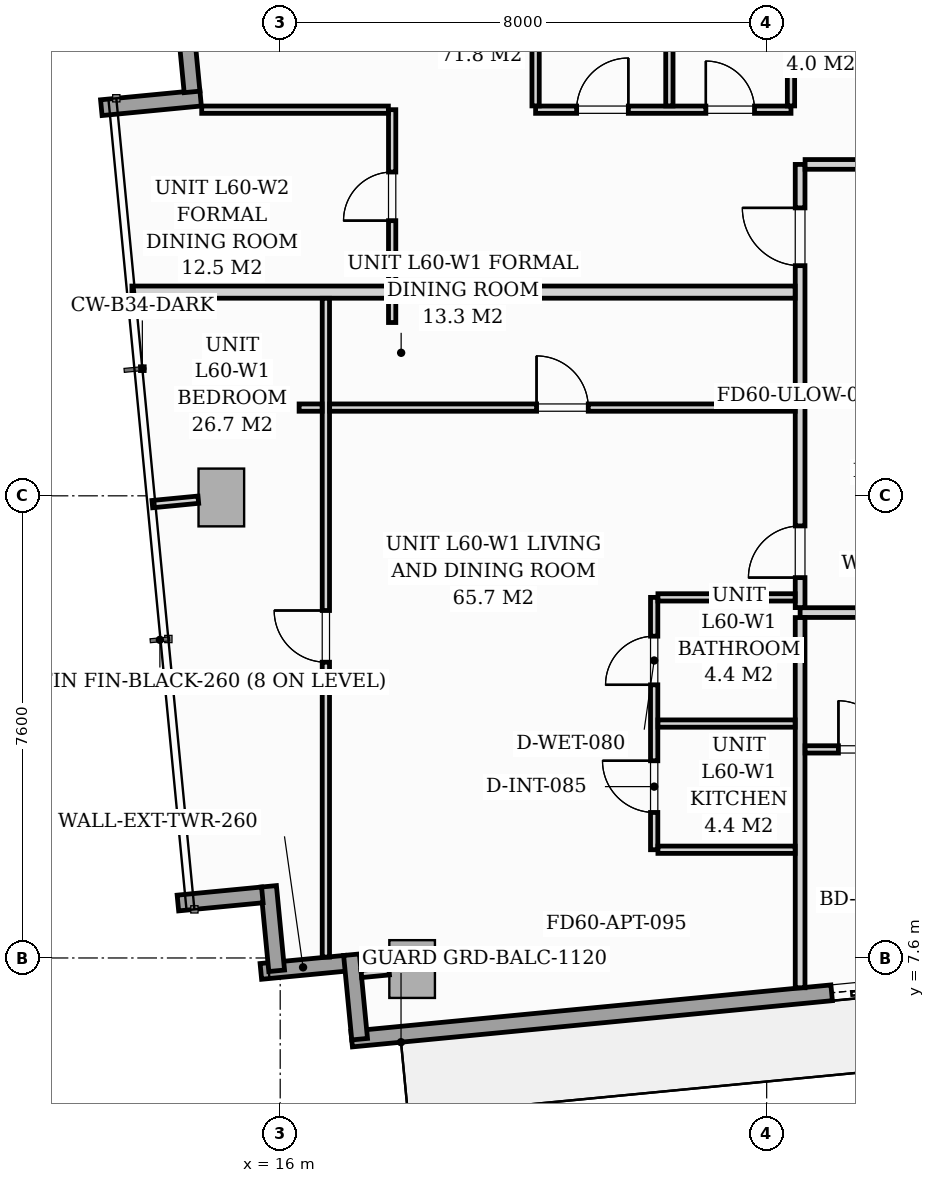
"""IFC4 building model, lengths in metres.
Left out: names, types, materials, properties, quantities, classifications, styles, units other than length and angle.
Written with IfcOpenShell. Run it as: python <this file> out.ifc"""

import sys

from ifc_helpers import new_model, si_unit, direction, frame, frame_2d, origin, origin_2d, place, context, subcontext, project, spatial, rectangle, extrude, source, transform, mapped, element, fill, save


model = new_model("IFC4")
c1 = context("Model", 3, precision=1e-05, world=origin(), true_north=direction((0.0, 1.0)))
c2 = subcontext(c1, "Body", "Model", "MODEL_VIEW")
j1 = project(units=[si_unit("LENGTHUNIT", "METRE"), si_unit("PLANEANGLEUNIT", "RADIAN")], contexts=[c1])
p1 = place(None, origin())
s1 = spatial("IfcSite", under=j1, at=p1, CompositionType="ELEMENT")
p2 = place(p1, origin())
s2 = spatial("IfcBuilding", under=s1, at=p2, CompositionType="ELEMENT")
p3 = place(p2, frame((0.0, 0.0, 208.2)))
s3 = spatial("IfcBuildingStorey", under=s2, at=p3, CompositionType="ELEMENT", Elevation=208.2)
m1 = source(origin(), c2, "Body", "SweptSolid", [
    extrude(rectangle(XDim=0.75, YDim=0.95, at=origin_2d()), origin(), (0.0, 0.0, 1.0), 3.194),
])
for number, where, z_axis, x_axis in (
    (1, (18.169, 7.418, 0.002), (0.0, 0.0, 1.0), (0.995, 0.096, 0.0)),
    (2, (15.032, 15.173, 0.002), (0.0, 0.0, 1.0), (0.995, 0.096, 0.0)),
):
    element("IfcColumn", number, at=place(p3, frame(where, z_axis=z_axis, x_axis=x_axis)), inside=s3, PredefinedType="COLUMN", context=c2, shape_type="MappedRepresentation", body=[
        mapped(m1, transform((0.0, 0.0, 0.0), scale=1.0)),
    ])
p4 = place(p3, frame((17.07, 7.513, 0.0), z_axis=(0.0, 0.0, 1.0), x_axis=(-0.995391056452, -0.09589913835, 0.0)))
e3 = element("IfcWall", 3, at=p4, inside=s3, PredefinedType="STANDARD", context=c2, shape_type="SweptSolid", body=[
    extrude(rectangle(XDim=1.395, YDim=0.26, at=frame_2d((0.698, 0.0))), origin(), (0.0, 0.0, 1.0), 2.9),
])
p5 = place(p3, frame((15.942, 7.389, 0.0), z_axis=(0.0, 0.0, 1.0), x_axis=(-0.095742423056, 0.99540614245, 0.0)))
e4 = element("IfcWall", 4, at=p5, inside=s3, PredefinedType="STANDARD", context=c2, shape_type="SweptSolid", body=[
    extrude(rectangle(XDim=1.395, YDim=0.26, at=frame_2d((0.697, 0.0))), origin(), (0.0, 0.0, 1.0), 2.9),
])
p6 = place(p3, frame((15.706, 8.637, 0.0), z_axis=(0.0, 0.0, 1.0), x_axis=(-0.995391056452, -0.09589913835, 0.0)))
e5 = element("IfcWall", 5, at=p6, inside=s3, PredefinedType="STANDARD", context=c2, shape_type="SweptSolid", body=[
    extrude(rectangle(XDim=1.395, YDim=0.26, at=frame_2d((0.698, 0.0))), origin(), (0.0, 0.0, 1.0), 2.9),
])
p7 = place(p3, frame((13.058, 21.583, 0.0), z_axis=(0.0, 0.0, 1.0), x_axis=(0.995394563142, 0.095862733462, 0.0)))
e6 = element("IfcWall", 6, at=p7, inside=s3, PredefinedType="STANDARD", context=c2, shape_type="SweptSolid", body=[
    extrude(rectangle(XDim=1.64, YDim=0.26, at=frame_2d((0.82, 0.0))), origin(), (0.0, 0.0, 1.0), 2.9),
])
p8 = place(p3, frame((14.55, 21.843, 0.0), z_axis=(0.0, 0.0, 1.0), x_axis=(-0.09576095695, 0.995404359607, 0.0)))
e7 = element("IfcWall", 7, at=p8, inside=s3, PredefinedType="STANDARD", context=c2, shape_type="SweptSolid", body=[
    extrude(rectangle(XDim=1.15, YDim=0.26, at=frame_2d((0.575, 0.0))), origin(), (0.0, 0.0, 1.0), 2.9),
])
p9 = place(p3, frame((33.201, 7.81, 0.0), z_axis=(0.0, 0.0, 1.0), x_axis=(-0.995397074604, -0.095836652014, 0.0)))
e8 = element("IfcWall", 8, at=p9, inside=s3, PredefinedType="STANDARD", context=c2, shape_type="SweptSolid", body=[
    extrude(rectangle(XDim=16.1, YDim=0.26, at=frame_2d((8.05, 0.0))), origin(), (0.0, 0.0, 1.0), 2.9),
])
p10 = place(p9, frame((6.37, 0.0, 0.0)))
e9 = element("IfcOpeningElement", 9, at=p10, cuts=e8, PredefinedType="OPENING", context=c2, shape_type="SweptSolid", body=[
    extrude(rectangle(XDim=1.8, YDim=2.06, at=frame_2d((0.9, 1.03))), frame((0.0, 0.14, 0.0), z_axis=(0.0, -1.0, 0.0), x_axis=(1.0, 0.0, 0.0)), (0.0, 0.0, 1.0), 0.28),
])
p11 = place(p9, frame((1.6, 0.0, 0.65)))
e10 = element("IfcOpeningElement", 10, at=p11, cuts=e8, PredefinedType="OPENING", context=c2, shape_type="SweptSolid", body=[
    extrude(rectangle(XDim=1.6, YDim=1.5, at=frame_2d((0.8, 0.75))), frame((0.0, 0.14, 0.0), z_axis=(0.0, -1.0, 0.0), x_axis=(1.0, 0.0, 0.0)), (0.0, 0.0, 1.0), 0.28),
])
p12 = place(p3, frame((17.306, 6.265, 0.0), z_axis=(0.0, 0.0, 1.0), x_axis=(-0.095915846097, 0.995389446633, 0.0)))
e11 = element("IfcWall", 11, at=p12, inside=s3, PredefinedType="STANDARD", context=c2, shape_type="SweptSolid", body=[
    extrude(rectangle(XDim=1.395, YDim=0.26, at=frame_2d((0.697, 0.0))), origin(), (0.0, 0.0, 1.0), 2.9),
])
p13 = place(p3, frame((24.55, 13.28, 0.0), z_axis=(0.0, 0.0, 1.0), x_axis=(1.0, 0.0, 0.0)))
e12 = element("IfcWall", 12, at=p13, inside=s3, PredefinedType="PARTITIONING", context=c2, shape_type="SweptSolid", body=[
    extrude(rectangle(XDim=22.9, YDim=0.16, at=frame_2d((11.45, 0.0))), origin(), (0.0, 0.0, 1.0), 2.9),
])
p14 = place(p13, frame((5.378, 0.0, 0.0)))
e13 = element("IfcOpeningElement", 13, at=p14, cuts=e12, PredefinedType="OPENING", context=c2, shape_type="SweptSolid", body=[
    extrude(rectangle(XDim=0.95, YDim=2.06, at=frame_2d((0.475, 1.03))), frame((0.0, 0.09, 0.0), z_axis=(0.0, -1.0, 0.0), x_axis=(1.0, 0.0, 0.0)), (0.0, 0.0, 1.0), 0.18),
])
p15 = place(p13, frame((13.025, 0.0, 0.0)))
e14 = element("IfcOpeningElement", 14, at=p15, cuts=e12, PredefinedType="OPENING", context=c2, shape_type="SweptSolid", body=[
    extrude(rectangle(XDim=0.95, YDim=2.06, at=frame_2d((0.475, 1.03))), frame((0.0, 0.09, 0.0), z_axis=(0.0, -1.0, 0.0), x_axis=(1.0, 0.0, 0.0)), (0.0, 0.0, 1.0), 0.18),
])
p16 = place(p13, frame((16.572, 0.0, 0.0)))
e15 = element("IfcOpeningElement", 15, at=p16, cuts=e12, PredefinedType="OPENING", context=c2, shape_type="SweptSolid", body=[
    extrude(rectangle(XDim=0.95, YDim=2.06, at=frame_2d((0.475, 1.03))), frame((0.0, 0.09, 0.0), z_axis=(0.0, -1.0, 0.0), x_axis=(1.0, 0.0, 0.0)), (0.0, 0.0, 1.0), 0.18),
])
p17 = place(p3, frame((24.55, 7.11, 0.0), z_axis=(0.0, 0.0, 1.0), x_axis=(0.0, 1.0, 0.0)))
e16 = element("IfcWall", 16, at=p17, inside=s3, PredefinedType="PARTITIONING", context=c2, shape_type="SweptSolid", body=[
    extrude(rectangle(XDim=6.088, YDim=0.16, at=frame_2d((3.044, 0.0))), origin(), (0.0, 0.0, 1.0), 2.9),
])
p18 = place(p3, frame((24.55, 13.362, 0.0), z_axis=(0.0, 0.0, 1.0), x_axis=(0.0, 1.0, 0.0)))
e17 = element("IfcWall", 17, at=p18, inside=s3, PredefinedType="PARTITIONING", context=c2, shape_type="SweptSolid", body=[
    extrude(rectangle(XDim=7.288, YDim=0.16, at=frame_2d((3.644, 0.0))), origin(), (0.0, 0.0, 1.0), 2.9),
])
p19 = place(p18, frame((0.493, 0.0, 0.0)))
e18 = element("IfcOpeningElement", 18, at=p19, cuts=e17, PredefinedType="OPENING", context=c2, shape_type="SweptSolid", body=[
    extrude(rectangle(XDim=0.85, YDim=2.0, at=frame_2d((0.425, 1.0))), frame((0.0, 0.09, 0.0), z_axis=(0.0, -1.0, 0.0), x_axis=(1.0, 0.0, 0.0)), (0.0, 0.0, 1.0), 0.18),
])
p20 = place(p18, frame((5.623, 0.0, 0.0)))
e19 = element("IfcOpeningElement", 19, at=p20, cuts=e17, PredefinedType="OPENING", context=c2, shape_type="SweptSolid", body=[
    extrude(rectangle(XDim=0.95, YDim=2.06, at=frame_2d((0.475, 1.03))), frame((0.0, 0.09, 0.0), z_axis=(0.0, -1.0, 0.0), x_axis=(1.0, 0.0, 0.0)), (0.0, 0.0, 1.0), 0.18),
])
p21 = place(p3, frame((24.632, 20.65, 0.0), z_axis=(0.0, 0.0, 1.0), x_axis=(1.0, 0.0, 0.0)))
e20 = element("IfcWall", 20, at=p21, inside=s3, PredefinedType="PARTITIONING", context=c2, shape_type="SweptSolid", body=[
    extrude(rectangle(XDim=1.566, YDim=0.16, at=frame_2d((0.783, 0.0))), origin(), (0.0, 0.0, 1.0), 2.9),
])
p22 = place(p3, frame((24.632, 11.03, 0.0), z_axis=(0.0, 0.0, 1.0), x_axis=(1.0, 0.0, 0.0)))
e21 = element("IfcWall", 21, at=p22, inside=s3, PredefinedType="PARTITIONING", context=c2, shape_type="SweptSolid", body=[
    extrude(rectangle(XDim=4.098, YDim=0.12, at=frame_2d((2.049, 0.0))), origin(), (0.0, 0.0, 1.0), 2.9),
])
p23 = place(p22, frame((0.548, 0.0, 0.0)))
e22 = element("IfcOpeningElement", 22, at=p23, cuts=e21, PredefinedType="OPENING", context=c2, shape_type="SweptSolid", body=[
    extrude(rectangle(XDim=0.8, YDim=2.02, at=frame_2d((0.4, 1.01))), frame((0.0, 0.07, 0.0), z_axis=(0.0, -1.0, 0.0), x_axis=(1.0, 0.0, 0.0)), (0.0, 0.0, 1.0), 0.14),
])
p24 = place(p22, frame((2.573, 0.0, 0.0)))
e23 = element("IfcOpeningElement", 23, at=p24, cuts=e21, PredefinedType="OPENING", context=c2, shape_type="SweptSolid", body=[
    extrude(rectangle(XDim=0.85, YDim=2.05, at=frame_2d((0.425, 1.025))), frame((0.0, 0.07, 0.0), z_axis=(0.0, -1.0, 0.0), x_axis=(1.0, 0.0, 0.0)), (0.0, 0.0, 1.0), 0.14),
])
p25 = place(p3, frame((13.561, 18.55, 0.0), z_axis=(0.0, 0.0, 1.0), x_axis=(1.0, 0.0, 0.0)))
e24 = element("IfcWall", 24, at=p25, inside=s3, PredefinedType="PARTITIONING", context=c2, shape_type="SweptSolid", body=[
    extrude(rectangle(XDim=10.907, YDim=0.2, at=frame_2d((5.453, 0.0))), origin(), (0.0, 0.0, 1.0), 2.9),
])
p26 = place(p3, frame((22.15, 9.38, 0.0), z_axis=(0.0, 0.0, 1.0), x_axis=(0.0, 1.0, 0.0)))
e25 = element("IfcWall", 25, at=p26, inside=s3, PredefinedType="PARTITIONING", context=c2, shape_type="SweptSolid", body=[
    extrude(rectangle(XDim=4.15, YDim=0.12, at=frame_2d((2.075, 0.0))), origin(), (0.0, 0.0, 1.0), 2.9),
])
p27 = place(p26, frame((0.613, 0.0, 0.0)))
e26 = element("IfcOpeningElement", 26, at=p27, cuts=e25, PredefinedType="OPENING", context=c2, shape_type="SweptSolid", body=[
    extrude(rectangle(XDim=0.85, YDim=2.05, at=frame_2d((0.425, 1.025))), frame((0.0, 0.07, 0.0), z_axis=(0.0, -1.0, 0.0), x_axis=(1.0, 0.0, 0.0)), (0.0, 0.0, 1.0), 0.14),
])
p28 = place(p26, frame((2.712, 0.0, 0.0)))
e27 = element("IfcOpeningElement", 27, at=p28, cuts=e25, PredefinedType="OPENING", context=c2, shape_type="SweptSolid", body=[
    extrude(rectangle(XDim=0.8, YDim=2.02, at=frame_2d((0.4, 1.01))), frame((0.0, 0.07, 0.0), z_axis=(0.0, -1.0, 0.0), x_axis=(1.0, 0.0, 0.0)), (0.0, 0.0, 1.0), 0.14),
])
for number, where, z_axis, x_axis in (
    (28, (22.212, 11.455, 0.0), (0.0, 0.0, 1.0), (1.0, 0.0, 0.0)),
    (29, (22.212, 9.38, 0.0), (0.0, 0.0, 1.0), (1.0, 0.0, 0.0)),
    (30, (22.212, 13.53, 0.0), (0.0, 0.0, 1.0), (1.0, 0.0, 0.0)),
):
    element("IfcWall", number, at=place(p3, frame(where, z_axis=z_axis, x_axis=x_axis)), inside=s3, PredefinedType="PARTITIONING", context=c2, shape_type="SweptSolid", body=[
        extrude(rectangle(XDim=2.256, YDim=0.12, at=frame_2d((1.128, 0.0))), origin(), (0.0, 0.0, 1.0), 2.9),
    ])
p29 = place(p3, frame((16.751, 7.615, 0.0), z_axis=(0.0, 0.0, 1.0), x_axis=(0.0, 1.0, 0.0)))
e31 = element("IfcWall", 31, at=p29, inside=s3, PredefinedType="PARTITIONING", context=c2, shape_type="SweptSolid", body=[
    extrude(rectangle(XDim=10.833, YDim=0.12, at=frame_2d((5.417, 0.0))), origin(), (0.0, 0.0, 1.0), 2.9),
])
p30 = place(p29, frame((4.849, 0.0, 0.0)))
e32 = element("IfcOpeningElement", 32, at=p30, cuts=e31, PredefinedType="OPENING", context=c2, shape_type="SweptSolid", body=[
    extrude(rectangle(XDim=0.85, YDim=2.05, at=frame_2d((0.425, 1.025))), frame((0.0, 0.07, 0.0), z_axis=(0.0, -1.0, 0.0), x_axis=(1.0, 0.0, 0.0)), (0.0, 0.0, 1.0), 0.14),
])
p31 = place(p3, frame((16.311, 16.651, 0.0), z_axis=(0.0, 0.0, 1.0), x_axis=(1.0, 0.0, 0.0)))
e33 = element("IfcWall", 33, at=p31, inside=s3, PredefinedType="PARTITIONING", context=c2, shape_type="SweptSolid", body=[
    extrude(rectangle(XDim=0.378, YDim=0.12, at=frame_2d((0.189, 0.0))), origin(), (0.0, 0.0, 1.0), 2.9),
])
p32 = place(p3, frame((16.813, 16.651, 0.0), z_axis=(0.0, 0.0, 1.0), x_axis=(1.0, 0.0, 0.0)))
e34 = element("IfcWall", 34, at=p32, inside=s3, PredefinedType="PARTITIONING", context=c2, shape_type="SweptSolid", body=[
    extrude(rectangle(XDim=7.655, YDim=0.12, at=frame_2d((3.828, 0.0))), origin(), (0.0, 0.0, 1.0), 2.241),
])
p33 = place(p32, frame((3.403, 0.0, 0.0)))
e35 = element("IfcOpeningElement", 35, at=p33, cuts=e34, PredefinedType="OPENING", context=c2, shape_type="SweptSolid", body=[
    extrude(rectangle(XDim=0.85, YDim=2.05, at=frame_2d((0.425, 1.025))), frame((0.0, 0.07, 0.0), z_axis=(0.0, -1.0, 0.0), x_axis=(1.0, 0.0, 0.0)), (0.0, 0.0, 1.0), 0.14),
])
p34 = place(p3, frame((20.2, 21.55, 0.0), z_axis=(0.0, 0.0, 1.0), x_axis=(1.0, 0.0, 0.0)))
e36 = element("IfcWall", 36, at=p34, inside=s3, PredefinedType="PARTITIONING", context=c2, shape_type="SweptSolid", body=[
    extrude(rectangle(XDim=4.2, YDim=0.12, at=frame_2d((2.1, 0.0))), origin(), (0.0, 0.0, 1.0), 2.9),
])
p35 = place(p34, frame((0.675, 0.0, 0.0)))
e37 = element("IfcOpeningElement", 37, at=p35, cuts=e36, PredefinedType="OPENING", context=c2, shape_type="SweptSolid", body=[
    extrude(rectangle(XDim=0.85, YDim=2.05, at=frame_2d((0.425, 1.025))), frame((0.0, 0.07, 0.0), z_axis=(0.0, -1.0, 0.0), x_axis=(1.0, 0.0, 0.0)), (0.0, 0.0, 1.0), 0.14),
])
p36 = place(p34, frame((2.8, 0.0, 0.0)))
e38 = element("IfcOpeningElement", 38, at=p36, cuts=e36, PredefinedType="OPENING", context=c2, shape_type="SweptSolid", body=[
    extrude(rectangle(XDim=0.8, YDim=2.02, at=frame_2d((0.4, 1.01))), frame((0.0, 0.07, 0.0), z_axis=(0.0, -1.0, 0.0), x_axis=(1.0, 0.0, 0.0)), (0.0, 0.0, 1.0), 0.14),
])
for number, where, z_axis, x_axis in (
    (39, (20.2, 21.612, 0.0), (0.0, 0.0, 1.0), (0.0, 1.0, 0.0)),
    (40, (22.4, 21.612, 0.0), (0.0, 0.0, 1.0), (0.0, 1.0, 0.0)),
    (41, (24.4, 21.612, 0.0), (0.0, 0.0, 1.0), (0.0, 1.0, 0.0)),
):
    element("IfcWall", number, at=place(p3, frame(where, z_axis=z_axis, x_axis=x_axis)), inside=s3, PredefinedType="PARTITIONING", context=c2, shape_type="SweptSolid", body=[
        extrude(rectangle(XDim=2.126, YDim=0.12, at=frame_2d((1.063, 0.0))), origin(), (0.0, 0.0, 1.0), 2.9),
    ])
p37 = place(p3, frame((17.841, 18.05, 0.0), z_axis=(0.0, 0.0, 1.0), x_axis=(0.0, 1.0, 0.0)))
e42 = element("IfcWall", 42, at=p37, inside=s3, PredefinedType="PARTITIONING", context=c2, shape_type="SweptSolid", body=[
    extrude(rectangle(XDim=0.398, YDim=0.12, at=frame_2d((0.199, 0.0))), origin(), (0.0, 0.0, 1.0), 2.9),
])
p38 = place(p3, frame((17.841, 18.652, 0.0), z_axis=(0.0, 0.0, 1.0), x_axis=(0.0, 1.0, 0.0)))
e43 = element("IfcWall", 43, at=p38, inside=s3, PredefinedType="PARTITIONING", context=c2, shape_type="SweptSolid", body=[
    extrude(rectangle(XDim=2.898, YDim=0.12, at=frame_2d((1.449, 0.0))), origin(), (0.0, 0.0, 1.0), 2.9),
])
p39 = place(p38, frame((1.073, 0.0, 0.0)))
e44 = element("IfcOpeningElement", 44, at=p39, cuts=e43, PredefinedType="OPENING", context=c2, shape_type="SweptSolid", body=[
    extrude(rectangle(XDim=0.8, YDim=2.0, at=frame_2d((0.4, 1.0))), frame((0.0, 0.07, 0.0), z_axis=(0.0, -1.0, 0.0), x_axis=(1.0, 0.0, 0.0)), (0.0, 0.0, 1.0), 0.14),
])
p40 = place(p3, frame((14.709, 21.55, 0.0), z_axis=(0.0, 0.0, 1.0), x_axis=(1.0, 0.0, 0.0)))
e45 = element("IfcWall", 45, at=p40, inside=s3, PredefinedType="PARTITIONING", context=c2, shape_type="SweptSolid", body=[
    extrude(rectangle(XDim=3.07, YDim=0.12, at=frame_2d((1.535, 0.0))), origin(), (0.0, 0.0, 1.0), 2.9),
])
p41 = place(p3, frame((17.791, 7.382, 0.0), z_axis=(0.0, 0.0, 1.0), x_axis=(-0.995384576284, -0.09596637586, 0.0)))
e46 = element("IfcWall", 46, at=p41, inside=s3, PredefinedType="PARTITIONING", context=c2, shape_type="SweptSolid", body=[
    extrude(rectangle(XDim=0.458, YDim=0.12, at=frame_2d((0.229, 0.0))), origin(), (0.0, 0.0, 1.0), 2.9),
])
p42 = place(p3, frame((14.654, 15.136, 0.0), z_axis=(0.0, 0.0, 1.0), x_axis=(-0.995408440582, -0.095718527039, 0.0)))
e47 = element("IfcWall", 47, at=p42, inside=s3, PredefinedType="PARTITIONING", context=c2, shape_type="SweptSolid", body=[
    extrude(rectangle(XDim=0.76, YDim=0.12, at=frame_2d((0.38, 0.0))), origin(), (0.0, 0.0, 1.0), 2.9),
])
m2 = source(origin(), c2, "Body", "SweptSolid", [
    extrude(rectangle(XDim=1.8, YDim=2.06, at=frame_2d((0.9, 1.03))), frame((0.0, 0.025, 0.0), z_axis=(0.0, -1.0, 0.0), x_axis=(1.0, 0.0, 0.0)), (0.0, 0.0, 1.0), 0.05),
])
p43 = place(p10, origin())
e48 = element("IfcDoor", 48, at=p43, inside=s3, OperationType="SLIDING_TO_LEFT", PredefinedType="DOOR", context=c2, shape_type="MappedRepresentation", body=[
    mapped(m2, transform((0.0, 0.0, 0.0), scale=1.0)),
])
fill(e9, e48)
m3 = source(origin(), c2, "Body", "SweptSolid", [
    extrude(rectangle(XDim=0.8, YDim=2.02, at=frame_2d((0.4, 1.01))), frame((0.0, 0.025, 0.0), z_axis=(0.0, -1.0, 0.0), x_axis=(1.0, 0.0, 0.0)), (0.0, 0.0, 1.0), 0.05),
])
p44 = place(p23, origin())
e49 = element("IfcDoor", 49, at=p44, inside=s3, OperationType="SINGLE_SWING_LEFT", PredefinedType="DOOR", context=c2, shape_type="MappedRepresentation", body=[
    mapped(m3, transform((0.0, 0.0, 0.0), scale=1.0)),
])
fill(e22, e49)
m4 = source(origin(), c2, "Body", "SweptSolid", [
    extrude(rectangle(XDim=0.85, YDim=2.0, at=frame_2d((0.425, 1.0))), frame((0.0, 0.025, 0.0), z_axis=(0.0, -1.0, 0.0), x_axis=(1.0, 0.0, 0.0)), (0.0, 0.0, 1.0), 0.05),
])
p45 = place(p19, origin())
e50 = element("IfcDoor", 50, at=p45, inside=s3, OperationType="SINGLE_SWING_LEFT", PredefinedType="DOOR", context=c2, shape_type="MappedRepresentation", body=[
    mapped(m4, transform((0.0, 0.0, 0.0), scale=1.0)),
])
fill(e18, e50)
m5 = source(origin(), c2, "Body", "SweptSolid", [
    extrude(rectangle(XDim=0.85, YDim=2.05, at=frame_2d((0.425, 1.025))), frame((0.0, 0.025, 0.0), z_axis=(0.0, -1.0, 0.0), x_axis=(1.0, 0.0, 0.0)), (0.0, 0.0, 1.0), 0.05),
])
p46 = place(p27, origin())
e51 = element("IfcDoor", 51, at=p46, inside=s3, OperationType="SINGLE_SWING_RIGHT", PredefinedType="DOOR", context=c2, shape_type="MappedRepresentation", body=[
    mapped(m5, transform((0.0, 0.0, 0.0), scale=1.0)),
])
fill(e26, e51)
p47 = place(p28, origin())
e52 = element("IfcDoor", 52, at=p47, inside=s3, OperationType="SINGLE_SWING_LEFT", PredefinedType="DOOR", context=c2, shape_type="MappedRepresentation", body=[
    mapped(m3, transform((0.0, 0.0, 0.0), scale=1.0)),
])
fill(e27, e52)
p48 = place(p30, origin())
e53 = element("IfcDoor", 53, at=p48, inside=s3, OperationType="SINGLE_SWING_RIGHT", PredefinedType="DOOR", context=c2, shape_type="MappedRepresentation", body=[
    mapped(m5, transform((0.0, 0.0, 0.0), scale=1.0)),
])
fill(e32, e53)
p49 = place(p33, origin())
e54 = element("IfcDoor", 54, at=p49, inside=s3, OperationType="SINGLE_SWING_LEFT", PredefinedType="DOOR", context=c2, shape_type="MappedRepresentation", body=[
    mapped(m5, transform((0.0, 0.0, 0.0), scale=1.0)),
])
fill(e35, e54)
m6 = source(origin(), c2, "Body", "SweptSolid", [
    extrude(rectangle(XDim=0.95, YDim=2.06, at=frame_2d((0.475, 1.03))), frame((0.0, 0.025, 0.0), z_axis=(0.0, -1.0, 0.0), x_axis=(1.0, 0.0, 0.0)), (0.0, 0.0, 1.0), 0.05),
])
p50 = place(p20, origin())
e55 = element("IfcDoor", 55, at=p50, inside=s3, OperationType="SINGLE_SWING_RIGHT", PredefinedType="DOOR", context=c2, shape_type="MappedRepresentation", body=[
    mapped(m6, transform((0.0, 0.0, 0.0), scale=1.0)),
])
fill(e19, e55)
m7 = source(origin(), c2, "Body", "SweptSolid", [
    extrude(rectangle(XDim=0.8, YDim=2.0, at=frame_2d((0.4, 1.0))), frame((0.0, 0.025, 0.0), z_axis=(0.0, -1.0, 0.0), x_axis=(1.0, 0.0, 0.0)), (0.0, 0.0, 1.0), 0.05),
])
p51 = place(p39, origin())
e56 = element("IfcDoor", 56, at=p51, inside=s3, OperationType="SINGLE_SWING_LEFT", PredefinedType="DOOR", context=c2, shape_type="MappedRepresentation", body=[
    mapped(m7, transform((0.0, 0.0, 0.0), scale=1.0)),
])
fill(e44, e56)
p52 = place(p35, origin())
e57 = element("IfcDoor", 57, at=p52, inside=s3, OperationType="SINGLE_SWING_RIGHT", PredefinedType="DOOR", context=c2, shape_type="MappedRepresentation", body=[
    mapped(m5, transform((0.0, 0.0, 0.0), scale=1.0)),
])
fill(e37, e57)
p53 = place(p36, origin())
e58 = element("IfcDoor", 58, at=p53, inside=s3, OperationType="SINGLE_SWING_LEFT", PredefinedType="DOOR", context=c2, shape_type="MappedRepresentation", body=[
    mapped(m3, transform((0.0, 0.0, 0.0), scale=1.0)),
])
fill(e38, e58)
save(model, sys.argv[1])
